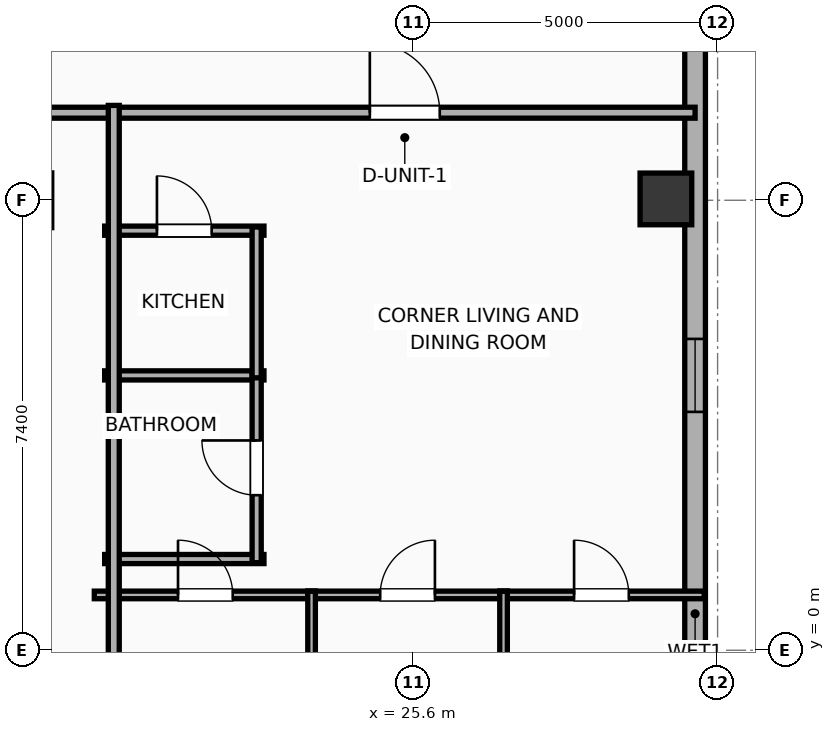
"""IFC4 building model, lengths in metres.
Left out: names, types, materials, properties, quantities, classifications, styles, units other than length and angle.
Written with IfcOpenShell. Run it as: python <this file> out.ifc"""

import sys

from ifc_helpers import new_model, si_unit, direction, frame, frame_2d, origin, origin_2d, place, context, subcontext, project, spatial, rectangle, hollow_rectangle, extrude, element, fill, save


model = new_model("IFC4")
c1 = context("Model", 3, precision=1e-05, world=origin(), true_north=direction((0.0, 1.0)))
c2 = subcontext(c1, "Body", "Model", "MODEL_VIEW")
j1 = project(units=[si_unit("LENGTHUNIT", "METRE"), si_unit("PLANEANGLEUNIT", "RADIAN")], contexts=[c1])
p1 = place(None, origin())
s1 = spatial("IfcSite", under=j1, at=p1, CompositionType="ELEMENT")
p2 = place(p1, origin())
s2 = spatial("IfcBuilding", under=s1, at=p2, CompositionType="ELEMENT")
p3 = place(p2, frame((0.0, 0.0, 227.5)))
s3 = spatial("IfcBuildingStorey", under=s2, at=p3, CompositionType="ELEMENT", Elevation=227.5)
p4 = place(p3, frame((29.75, 7.422, 0.0), z_axis=(0.0, 0.0, 1.0), x_axis=(1.0, 0.0, 0.0)))
e1 = element("IfcColumn", 1, at=p4, inside=s3, PredefinedType="COLUMN", context=c2, shape_type="SweptSolid", body=[
    extrude(hollow_rectangle(XDim=0.85, YDim=0.85, WallThickness=0.028, at=origin_2d()), origin(), (0.0, 0.0, 1.0), 3.9),
])
p5 = place(p3, frame((30.23, 16.583, 0.0), z_axis=(0.0, 0.0, 1.0), x_axis=(0.0, -1.0, 0.0)))
e2 = element("IfcWall", 2, at=p5, inside=s3, PredefinedType="ELEMENTEDWALL", context=c2, shape_type="SweptSolid", body=[
    extrude(rectangle(XDim=31.967, YDim=0.34, at=frame_2d((15.983, 0.0))), origin(), (0.0, 0.0, 1.0), 3.65),
])
p6 = place(p5, frame((30.106, 0.0, 0.75)))
e3 = element("IfcOpeningElement", 3, at=p6, cuts=e2, PredefinedType="OPENING", context=c2, shape_type="SweptSolid", body=[
    extrude(rectangle(XDim=1.2, YDim=2.05, at=frame_2d((0.6, 1.025))), frame((0.0, 0.18, 0.0), z_axis=(0.0, -1.0, 0.0), x_axis=(1.0, 0.0, 0.0)), (0.0, 0.0, 1.0), 0.36),
])
p7 = place(p5, frame((11.463, 0.0, 0.75)))
e4 = element("IfcOpeningElement", 4, at=p7, cuts=e2, PredefinedType="OPENING", context=c2, shape_type="SweptSolid", body=[
    extrude(rectangle(XDim=1.2, YDim=2.05, at=frame_2d((0.6, 1.025))), frame((0.0, 0.18, 0.0), z_axis=(0.0, -1.0, 0.0), x_axis=(1.0, 0.0, 0.0)), (0.0, 0.0, 1.0), 0.36),
])
p8 = place(p5, frame((20.363, 0.0, 0.75)))
e5 = element("IfcOpeningElement", 5, at=p8, cuts=e2, PredefinedType="OPENING", context=c2, shape_type="SweptSolid", body=[
    extrude(rectangle(XDim=1.2, YDim=2.05, at=frame_2d((0.6, 1.025))), frame((0.0, 0.18, 0.0), z_axis=(0.0, -1.0, 0.0), x_axis=(1.0, 0.0, 0.0)), (0.0, 0.0, 1.0), 0.36),
])
p9 = place(p3, frame((9.88, 8.84, 0.0), z_axis=(0.0, 0.0, 1.0), x_axis=(1.0, 0.0, 0.0)))
e6 = element("IfcWall", 6, at=p9, inside=s3, PredefinedType="PARTITIONING", context=c2, shape_type="SweptSolid", body=[
    extrude(rectangle(XDim=20.35, YDim=0.18, at=frame_2d((10.175, 0.0))), origin(), (0.0, 0.0, 1.0), 3.65),
])
p10 = place(p9, frame((15.001, 0.0, 0.0)))
e7 = element("IfcOpeningElement", 7, at=p10, cuts=e6, PredefinedType="OPENING", context=c2, shape_type="SweptSolid", body=[
    extrude(rectangle(XDim=1.15, YDim=2.05, at=frame_2d((0.575, 1.025))), frame((0.0, 0.1, 0.0), z_axis=(0.0, -1.0, 0.0), x_axis=(1.0, 0.0, 0.0)), (0.0, 0.0, 1.0), 0.2),
])
p11 = place(p3, frame((20.52, 6.9, 0.0), z_axis=(0.0, 0.0, 1.0), x_axis=(1.0, 0.0, 0.0)))
e8 = element("IfcWall", 8, at=p11, inside=s3, PredefinedType="PLUMBINGWALL", context=c2, shape_type="SweptSolid", body=[
    extrude(rectangle(XDim=2.62, YDim=0.15, at=frame_2d((1.31, 0.0))), origin(), (0.0, 0.0, 1.0), 3.65),
])
p12 = place(p11, frame((0.86, 0.0, 0.0)))
e9 = element("IfcOpeningElement", 9, at=p12, cuts=e8, PredefinedType="OPENING", context=c2, shape_type="SweptSolid", body=[
    extrude(rectangle(XDim=0.9, YDim=2.05, at=frame_2d((0.45, 1.025))), frame((0.0, 0.085, 0.0), z_axis=(0.0, -1.0, 0.0), x_axis=(1.0, 0.0, 0.0)), (0.0, 0.0, 1.0), 0.17),
])
for number, where, z_axis, x_axis in (
    (10, (20.52, 4.52, 0.0), (0.0, 0.0, 1.0), (1.0, 0.0, 0.0)),
    (11, (20.52, 1.5, 0.0), (0.0, 0.0, 1.0), (1.0, 0.0, 0.0)),
):
    element("IfcWall", number, at=place(p3, frame(where, z_axis=z_axis, x_axis=x_axis)), inside=s3, PredefinedType="PLUMBINGWALL", context=c2, shape_type="SweptSolid", body=[
        extrude(rectangle(XDim=2.62, YDim=0.15, at=frame_2d((1.31, 0.0))), origin(), (0.0, 0.0, 1.0), 3.65),
    ])
p13 = place(p3, frame((23.02, 1.44, 0.0), z_axis=(0.0, 0.0, 1.0), x_axis=(0.0, 1.0, 0.0)))
e12 = element("IfcWall", 12, at=p13, inside=s3, PredefinedType="PLUMBINGWALL", context=c2, shape_type="SweptSolid", body=[
    extrude(rectangle(XDim=3.12, YDim=0.15, at=frame_2d((1.56, 0.0))), origin(), (0.0, 0.0, 1.0), 3.65),
])
p14 = place(p13, frame((1.11, 0.0, 0.0)))
e13 = element("IfcOpeningElement", 13, at=p14, cuts=e12, PredefinedType="OPENING", context=c2, shape_type="SweptSolid", body=[
    extrude(rectangle(XDim=0.9, YDim=2.05, at=frame_2d((0.45, 1.025))), frame((0.0, 0.085, 0.0), z_axis=(0.0, -1.0, 0.0), x_axis=(1.0, 0.0, 0.0)), (0.0, 0.0, 1.0), 0.17),
])
p15 = place(p3, frame((23.02, 4.48, 0.0), z_axis=(0.0, 0.0, 1.0), x_axis=(0.0, 1.0, 0.0)))
e14 = element("IfcWall", 14, at=p15, inside=s3, PredefinedType="PLUMBINGWALL", context=c2, shape_type="SweptSolid", body=[
    extrude(rectangle(XDim=2.48, YDim=0.15, at=frame_2d((1.24, 0.0))), origin(), (0.0, 0.0, 1.0), 3.65),
])
p16 = place(p3, frame((20.35, 0.91, 0.0), z_axis=(0.0, 0.0, 1.0), x_axis=(1.0, 0.0, 0.0)))
e15 = element("IfcWall", 15, at=p16, inside=s3, PredefinedType="PARTITIONING", context=c2, shape_type="SweptSolid", body=[
    extrude(rectangle(XDim=3.635, YDim=0.125, at=frame_2d((1.818, 0.0))), origin(), (0.0, 0.0, 1.0), 3.65),
])
p17 = place(p16, frame((1.376, 0.0, 0.0)))
e16 = element("IfcOpeningElement", 16, at=p17, cuts=e15, PredefinedType="OPENING", context=c2, shape_type="SweptSolid", body=[
    extrude(rectangle(XDim=0.9, YDim=2.05, at=frame_2d((0.45, 1.025))), frame((0.0, 0.073, 0.0), z_axis=(0.0, -1.0, 0.0), x_axis=(1.0, 0.0, 0.0)), (0.0, 0.0, 1.0), 0.145),
])
p18 = place(p3, frame((23.861, 0.91, 0.0), z_axis=(0.0, 0.0, 1.0), x_axis=(1.0, 0.0, 0.0)))
e17 = element("IfcWall", 17, at=p18, inside=s3, PredefinedType="PARTITIONING", context=c2, shape_type="SweptSolid", body=[
    extrude(rectangle(XDim=3.282, YDim=0.125, at=frame_2d((1.641, 0.0))), origin(), (0.0, 0.0, 1.0), 3.65),
])
p19 = place(p18, frame((1.191, 0.0, 0.0)))
e18 = element("IfcOpeningElement", 18, at=p19, cuts=e17, PredefinedType="OPENING", context=c2, shape_type="SweptSolid", body=[
    extrude(rectangle(XDim=0.9, YDim=2.05, at=frame_2d((0.45, 1.025))), frame((0.0, 0.073, 0.0), z_axis=(0.0, -1.0, 0.0), x_axis=(1.0, 0.0, 0.0)), (0.0, 0.0, 1.0), 0.145),
])
p20 = place(p3, frame((27.018, 0.91, 0.0), z_axis=(0.0, 0.0, 1.0), x_axis=(1.0, 0.0, 0.0)))
e19 = element("IfcWall", 19, at=p20, inside=s3, PredefinedType="PARTITIONING", context=c2, shape_type="SweptSolid", body=[
    extrude(rectangle(XDim=3.362, YDim=0.125, at=frame_2d((1.681, 0.0))), origin(), (0.0, 0.0, 1.0), 3.65),
])
p21 = place(p20, frame((1.222, 0.0, 0.0)))
e20 = element("IfcOpeningElement", 20, at=p21, cuts=e19, PredefinedType="OPENING", context=c2, shape_type="SweptSolid", body=[
    extrude(rectangle(XDim=0.9, YDim=2.05, at=frame_2d((0.45, 1.025))), frame((0.0, 0.073, 0.0), z_axis=(0.0, -1.0, 0.0), x_axis=(1.0, 0.0, 0.0)), (0.0, 0.0, 1.0), 0.145),
])
for number, where, z_axis, x_axis in (
    (21, (27.08, -9.16, 0.0), (0.0, 0.0, 1.0), (0.0, 1.0, 0.0)),
    (22, (23.923, -9.16, 0.0), (0.0, 0.0, 1.0), (0.0, 1.0, 0.0)),
):
    element("IfcWall", number, at=place(p3, frame(where, z_axis=z_axis, x_axis=x_axis)), inside=s3, PredefinedType="PARTITIONING", context=c2, shape_type="SweptSolid", body=[
        extrude(rectangle(XDim=10.13, YDim=0.125, at=frame_2d((5.065, 0.0))), origin(), (0.0, 0.0, 1.0), 3.65),
    ])
p22 = place(p3, frame((20.67, -8.96, 0.0), z_axis=(0.0, 0.0, 1.0), x_axis=(0.0, 1.0, 0.0)))
e23 = element("IfcWall", 23, at=p22, inside=s3, PredefinedType="PARTITIONING", context=c2, shape_type="SweptSolid", body=[
    extrude(rectangle(XDim=17.92, YDim=0.18, at=frame_2d((8.96, 0.0))), origin(), (0.0, 0.0, 1.0), 3.65),
])
p23 = place(p7, origin())
e24 = element("IfcWindow", 24, at=p23, inside=s3, PartitioningType="SINGLE_PANEL", PredefinedType="WINDOW", context=c2, shape_type="SweptSolid", body=[
    extrude(rectangle(XDim=1.2, YDim=2.05, at=frame_2d((0.6, 1.025))), frame((0.0, 0.03, 0.0), z_axis=(0.0, -1.0, 0.0), x_axis=(1.0, 0.0, 0.0)), (0.0, 0.0, 1.0), 0.06),
])
fill(e4, e24)
p24 = place(p10, origin())
e25 = element("IfcDoor", 25, at=p24, inside=s3, OperationType="SINGLE_SWING_LEFT", PredefinedType="DOOR", context=c2, shape_type="SweptSolid", body=[
    extrude(rectangle(XDim=1.15, YDim=2.05, at=frame_2d((0.575, 1.025))), frame((0.0, 0.025, 0.0), z_axis=(0.0, -1.0, 0.0), x_axis=(1.0, 0.0, 0.0)), (0.0, 0.0, 1.0), 0.05),
])
fill(e7, e25)
p25 = place(p12, origin())
e26 = element("IfcDoor", 26, at=p25, inside=s3, OperationType="SINGLE_SWING_LEFT", PredefinedType="DOOR", context=c2, shape_type="SweptSolid", body=[
    extrude(rectangle(XDim=0.9, YDim=2.05, at=frame_2d((0.45, 1.025))), frame((0.0, 0.025, 0.0), z_axis=(0.0, -1.0, 0.0), x_axis=(1.0, 0.0, 0.0)), (0.0, 0.0, 1.0), 0.05),
])
fill(e9, e26)
p26 = place(p14, origin())
e27 = element("IfcDoor", 27, at=p26, inside=s3, OperationType="SINGLE_SWING_RIGHT", PredefinedType="DOOR", context=c2, shape_type="SweptSolid", body=[
    extrude(rectangle(XDim=0.9, YDim=2.05, at=frame_2d((0.45, 1.025))), frame((0.0, 0.025, 0.0), z_axis=(0.0, -1.0, 0.0), x_axis=(1.0, 0.0, 0.0)), (0.0, 0.0, 1.0), 0.05),
])
fill(e13, e27)
p27 = place(p17, origin())
e28 = element("IfcDoor", 28, at=p27, inside=s3, OperationType="SINGLE_SWING_LEFT", PredefinedType="DOOR", context=c2, shape_type="SweptSolid", body=[
    extrude(rectangle(XDim=0.9, YDim=2.05, at=frame_2d((0.45, 1.025))), frame((0.0, 0.025, 0.0), z_axis=(0.0, -1.0, 0.0), x_axis=(1.0, 0.0, 0.0)), (0.0, 0.0, 1.0), 0.05),
])
fill(e16, e28)
p28 = place(p19, origin())
e29 = element("IfcDoor", 29, at=p28, inside=s3, OperationType="SINGLE_SWING_RIGHT", PredefinedType="DOOR", context=c2, shape_type="SweptSolid", body=[
    extrude(rectangle(XDim=0.9, YDim=2.05, at=frame_2d((0.45, 1.025))), frame((0.0, 0.025, 0.0), z_axis=(0.0, -1.0, 0.0), x_axis=(1.0, 0.0, 0.0)), (0.0, 0.0, 1.0), 0.05),
])
fill(e18, e29)
p29 = place(p21, origin())
e30 = element("IfcDoor", 30, at=p29, inside=s3, OperationType="SINGLE_SWING_LEFT", PredefinedType="DOOR", context=c2, shape_type="SweptSolid", body=[
    extrude(rectangle(XDim=0.9, YDim=2.05, at=frame_2d((0.45, 1.025))), frame((0.0, 0.025, 0.0), z_axis=(0.0, -1.0, 0.0), x_axis=(1.0, 0.0, 0.0)), (0.0, 0.0, 1.0), 0.05),
])
fill(e20, e30)
save(model, sys.argv[1])
